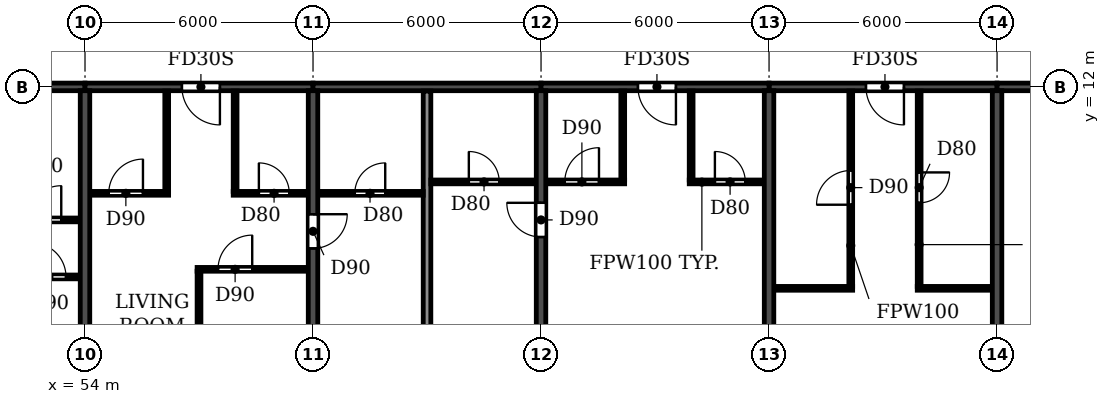
"""IFC4 building model, lengths in metres.
Left out: names, types, materials, properties, quantities, classifications, styles, units other than length and angle.
Written with IfcOpenShell. Run it as: python <this file> out.ifc"""

import sys

from ifc_helpers import new_model, si_unit, direction, frame, frame_2d, origin, place, context, subcontext, project, spatial, rectangle, extrude, element, fill, save


model = new_model("IFC4")
c1 = context("Model", 3, precision=1e-05, world=origin(), true_north=direction((0.0, 1.0)))
c2 = subcontext(c1, "Body", "Model", "MODEL_VIEW")
j1 = project(units=[si_unit("LENGTHUNIT", "METRE"), si_unit("PLANEANGLEUNIT", "RADIAN")], contexts=[c1])
p1 = place(None, origin())
s1 = spatial("IfcSite", under=j1, at=p1, CompositionType="ELEMENT")
p2 = place(p1, origin())
s2 = spatial("IfcBuilding", under=s1, at=p2, CompositionType="ELEMENT")
p3 = place(p2, frame((0.0, 0.0, 201.6)))
s3 = spatial("IfcBuildingStorey", under=s2, at=p3, CompositionType="ELEMENT", Elevation=201.6)
p4 = place(p3, frame((54.0, 0.2, 0.0), z_axis=(0.0, 0.0, 1.0), x_axis=(0.0, 1.0, 0.0)))
e1 = element("IfcWall", 1, at=p4, inside=s3, PredefinedType="SHEAR", context=c2, shape_type="SweptSolid", body=[
    extrude(rectangle(XDim=11.7, YDim=0.25, at=frame_2d((5.85, 0.0))), origin(), (0.0, 0.0, 1.0), 3.08),
])
p5 = place(p3, frame((60.0, 0.2, 0.0), z_axis=(0.0, 0.0, 1.0), x_axis=(0.0, 1.0, 0.0)))
e2 = element("IfcWall", 2, at=p5, inside=s3, PredefinedType="SHEAR", context=c2, shape_type="SweptSolid", body=[
    extrude(rectangle(XDim=11.7, YDim=0.25, at=frame_2d((5.85, 0.0))), origin(), (0.0, 0.0, 1.0), 3.08),
])
p6 = place(p5, frame((7.55, 0.0, 0.0)))
e3 = element("IfcOpeningElement", 3, at=p6, cuts=e2, PredefinedType="OPENING", context=c2, shape_type="SweptSolid", body=[
    extrude(rectangle(XDim=0.9, YDim=2.1, at=frame_2d((0.45, 1.05))), frame((0.0, 0.135, 0.0), z_axis=(0.0, -1.0, 0.0), x_axis=(1.0, 0.0, 0.0)), (0.0, 0.0, 1.0), 0.27),
])
p7 = place(p3, frame((66.0, 0.2, 0.0), z_axis=(0.0, 0.0, 1.0), x_axis=(0.0, 1.0, 0.0)))
e4 = element("IfcWall", 4, at=p7, inside=s3, PredefinedType="SHEAR", context=c2, shape_type="SweptSolid", body=[
    extrude(rectangle(XDim=11.7, YDim=0.25, at=frame_2d((5.85, 0.0))), origin(), (0.0, 0.0, 1.0), 3.08),
])
p8 = place(p7, frame((7.85, 0.0, 0.0)))
e5 = element("IfcOpeningElement", 5, at=p8, cuts=e4, PredefinedType="OPENING", context=c2, shape_type="SweptSolid", body=[
    extrude(rectangle(XDim=0.9, YDim=2.1, at=frame_2d((0.45, 1.05))), frame((0.0, 0.135, 0.0), z_axis=(0.0, -1.0, 0.0), x_axis=(1.0, 0.0, 0.0)), (0.0, 0.0, 1.0), 0.27),
])
for number, where, z_axis, x_axis in (
    (6, (72.0, 0.2, 0.0), (0.0, 0.0, 1.0), (0.0, 1.0, 0.0)),
    (7, (78.0, 0.2, 0.0), (0.0, 0.0, 1.0), (0.0, 1.0, 0.0)),
):
    element("IfcWall", number, at=place(p3, frame(where, z_axis=z_axis, x_axis=x_axis)), inside=s3, PredefinedType="SHEAR", context=c2, shape_type="SweptSolid", body=[
        extrude(rectangle(XDim=11.7, YDim=0.25, at=frame_2d((5.85, 0.0))), origin(), (0.0, 0.0, 1.0), 3.08),
    ])
p9 = place(p3, frame((48.0, 12.0, 0.0), z_axis=(0.0, 0.0, 1.0), x_axis=(1.0, 0.0, 0.0)))
e8 = element("IfcWall", 8, at=p9, inside=s3, PredefinedType="SHEAR", context=c2, shape_type="SweptSolid", body=[
    extrude(rectangle(XDim=6.0, YDim=0.2, at=frame_2d((3.0, 0.0))), origin(), (0.0, 0.0, 1.0), 2.48),
])
p10 = place(p9, frame((2.45, 0.0, 0.0)))
e9 = element("IfcOpeningElement", 9, at=p10, cuts=e8, PredefinedType="OPENING", context=c2, shape_type="SweptSolid", body=[
    extrude(rectangle(XDim=1.0, YDim=2.1, at=frame_2d((0.5, 1.05))), frame((0.0, 0.11, 0.0), z_axis=(0.0, -1.0, 0.0), x_axis=(1.0, 0.0, 0.0)), (0.0, 0.0, 1.0), 0.22),
])
p11 = place(p3, frame((54.0, 12.0, 0.0), z_axis=(0.0, 0.0, 1.0), x_axis=(1.0, 0.0, 0.0)))
e10 = element("IfcWall", 10, at=p11, inside=s3, PredefinedType="SHEAR", context=c2, shape_type="SweptSolid", body=[
    extrude(rectangle(XDim=6.0, YDim=0.2, at=frame_2d((3.0, 0.0))), origin(), (0.0, 0.0, 1.0), 2.48),
])
p12 = place(p11, frame((2.55, 0.0, 0.0)))
e11 = element("IfcOpeningElement", 11, at=p12, cuts=e10, PredefinedType="OPENING", context=c2, shape_type="SweptSolid", body=[
    extrude(rectangle(XDim=1.0, YDim=2.1, at=frame_2d((0.5, 1.05))), frame((0.0, 0.11, 0.0), z_axis=(0.0, -1.0, 0.0), x_axis=(1.0, 0.0, 0.0)), (0.0, 0.0, 1.0), 0.22),
])
p13 = place(p3, frame((60.0, 12.0, 0.0), z_axis=(0.0, 0.0, 1.0), x_axis=(1.0, 0.0, 0.0)))
e12 = element("IfcWall", 12, at=p13, inside=s3, PredefinedType="SHEAR", context=c2, shape_type="SweptSolid", body=[
    extrude(rectangle(XDim=6.0, YDim=0.2, at=frame_2d((3.0, 0.0))), origin(), (0.0, 0.0, 1.0), 2.48),
])
p14 = place(p3, frame((66.0, 12.0, 0.0), z_axis=(0.0, 0.0, 1.0), x_axis=(1.0, 0.0, 0.0)))
e13 = element("IfcWall", 13, at=p14, inside=s3, PredefinedType="SHEAR", context=c2, shape_type="SweptSolid", body=[
    extrude(rectangle(XDim=6.0, YDim=0.2, at=frame_2d((3.0, 0.0))), origin(), (0.0, 0.0, 1.0), 2.48),
])
p15 = place(p14, frame((2.55, 0.0, 0.0)))
e14 = element("IfcOpeningElement", 14, at=p15, cuts=e13, PredefinedType="OPENING", context=c2, shape_type="SweptSolid", body=[
    extrude(rectangle(XDim=1.0, YDim=2.1, at=frame_2d((0.5, 1.05))), frame((0.0, 0.11, 0.0), z_axis=(0.0, -1.0, 0.0), x_axis=(1.0, 0.0, 0.0)), (0.0, 0.0, 1.0), 0.22),
])
p16 = place(p3, frame((72.0, 12.0, 0.0), z_axis=(0.0, 0.0, 1.0), x_axis=(1.0, 0.0, 0.0)))
e15 = element("IfcWall", 15, at=p16, inside=s3, PredefinedType="SHEAR", context=c2, shape_type="SweptSolid", body=[
    extrude(rectangle(XDim=6.0, YDim=0.2, at=frame_2d((3.0, 0.0))), origin(), (0.0, 0.0, 1.0), 2.48),
])
p17 = place(p16, frame((2.55, 0.0, 0.0)))
e16 = element("IfcOpeningElement", 16, at=p17, cuts=e15, PredefinedType="OPENING", context=c2, shape_type="SweptSolid", body=[
    extrude(rectangle(XDim=1.0, YDim=2.1, at=frame_2d((0.5, 1.05))), frame((0.0, 0.11, 0.0), z_axis=(0.0, -1.0, 0.0), x_axis=(1.0, 0.0, 0.0)), (0.0, 0.0, 1.0), 0.22),
])
p18 = place(p3, frame((78.0, 12.0, 0.0), z_axis=(0.0, 0.0, 1.0), x_axis=(1.0, 0.0, 0.0)))
e17 = element("IfcWall", 17, at=p18, inside=s3, PredefinedType="SHEAR", context=c2, shape_type="SweptSolid", body=[
    extrude(rectangle(XDim=5.8, YDim=0.2, at=frame_2d((2.9, 0.0))), origin(), (0.0, 0.0, 1.0), 2.48),
])
p19 = place(p18, frame((2.5, 0.0, 0.0)))
e18 = element("IfcOpeningElement", 18, at=p19, cuts=e17, PredefinedType="OPENING", context=c2, shape_type="SweptSolid", body=[
    extrude(rectangle(XDim=1.0, YDim=2.1, at=frame_2d((0.5, 1.05))), frame((0.0, 0.11, 0.0), z_axis=(0.0, -1.0, 0.0), x_axis=(1.0, 0.0, 0.0)), (0.0, 0.0, 1.0), 0.22),
])
p20 = place(p3, frame((63.0, 0.06, 0.0), z_axis=(0.0, 0.0, 1.0), x_axis=(0.0, 1.0, 0.0)))
e19 = element("IfcWall", 19, at=p20, inside=s3, PredefinedType="PARTITIONING", context=c2, shape_type="SweptSolid", body=[
    extrude(rectangle(XDim=11.83, YDim=0.2, at=frame_2d((5.915, 0.0))), origin(), (0.0, 0.0, 1.0), 3.08),
])
p21 = place(p3, frame((72.135, 6.7, 0.0), z_axis=(0.0, 0.0, 1.0), x_axis=(1.0, 0.0, 0.0)))
e20 = element("IfcWall", 20, at=p21, inside=s3, PredefinedType="PARTITIONING", context=c2, shape_type="SweptSolid", body=[
    extrude(rectangle(XDim=2.065, YDim=0.1, at=frame_2d((1.032, 0.0))), origin(), (0.0, 0.0, 1.0), 3.08),
])
p22 = place(p3, frame((75.9, 6.7, 0.0), z_axis=(0.0, 0.0, 1.0), x_axis=(1.0, 0.0, 0.0)))
e21 = element("IfcWall", 21, at=p22, inside=s3, PredefinedType="PARTITIONING", context=c2, shape_type="SweptSolid", body=[
    extrude(rectangle(XDim=1.965, YDim=0.1, at=frame_2d((0.982, 0.0))), origin(), (0.0, 0.0, 1.0), 3.08),
])
p23 = place(p3, frame((50.95, 7.0, 0.0), z_axis=(0.0, 0.0, 1.0), x_axis=(1.0, 0.0, 0.0)))
e22 = element("IfcWall", 22, at=p23, inside=s3, PredefinedType="PARTITIONING", context=c2, shape_type="SweptSolid", body=[
    extrude(rectangle(XDim=2.915, YDim=0.1, at=frame_2d((1.458, 0.0))), origin(), (0.0, 0.0, 1.0), 3.08),
])
p24 = place(p23, frame((1.65, 0.0, 0.0)))
e23 = element("IfcOpeningElement", 23, at=p24, cuts=e22, PredefinedType="OPENING", context=c2, shape_type="SweptSolid", body=[
    extrude(rectangle(XDim=0.9, YDim=2.1, at=frame_2d((0.45, 1.05))), frame((0.0, 0.06, 0.0), z_axis=(0.0, -1.0, 0.0), x_axis=(1.0, 0.0, 0.0)), (0.0, 0.0, 1.0), 0.12),
])
p25 = place(p3, frame((56.95, 7.2, 0.0), z_axis=(0.0, 0.0, 1.0), x_axis=(1.0, 0.0, 0.0)))
e24 = element("IfcWall", 24, at=p25, inside=s3, PredefinedType="PARTITIONING", context=c2, shape_type="SweptSolid", body=[
    extrude(rectangle(XDim=2.915, YDim=0.1, at=frame_2d((1.458, 0.0))), origin(), (0.0, 0.0, 1.0), 3.08),
])
p26 = place(p25, frame((0.55, 0.0, 0.0)))
e25 = element("IfcOpeningElement", 25, at=p26, cuts=e24, PredefinedType="OPENING", context=c2, shape_type="SweptSolid", body=[
    extrude(rectangle(XDim=0.9, YDim=2.1, at=frame_2d((0.45, 1.05))), frame((0.0, 0.06, 0.0), z_axis=(0.0, -1.0, 0.0), x_axis=(1.0, 0.0, 0.0)), (0.0, 0.0, 1.0), 0.12),
])
p27 = place(p3, frame((51.8, 8.5, 0.0), z_axis=(0.0, 0.0, 1.0), x_axis=(1.0, 0.0, 0.0)))
e26 = element("IfcWall", 26, at=p27, inside=s3, PredefinedType="PARTITIONING", context=c2, shape_type="SweptSolid", body=[
    extrude(rectangle(XDim=2.065, YDim=0.1, at=frame_2d((1.032, 0.0))), origin(), (0.0, 0.0, 1.0), 3.08),
])
p28 = place(p27, frame((0.675, 0.0, 0.0)))
e27 = element("IfcOpeningElement", 27, at=p28, cuts=e26, PredefinedType="OPENING", context=c2, shape_type="SweptSolid", body=[
    extrude(rectangle(XDim=0.9, YDim=2.1, at=frame_2d((0.45, 1.05))), frame((0.0, 0.06, 0.0), z_axis=(0.0, -1.0, 0.0), x_axis=(1.0, 0.0, 0.0)), (0.0, 0.0, 1.0), 0.12),
])
p29 = place(p3, frame((54.135, 9.2, 0.0), z_axis=(0.0, 0.0, 1.0), x_axis=(1.0, 0.0, 0.0)))
e28 = element("IfcWall", 28, at=p29, inside=s3, PredefinedType="PARTITIONING", context=c2, shape_type="SweptSolid", body=[
    extrude(rectangle(XDim=2.065, YDim=0.1, at=frame_2d((1.032, 0.0))), origin(), (0.0, 0.0, 1.0), 3.08),
])
p30 = place(p29, frame((0.49, 0.0, 0.0)))
e29 = element("IfcOpeningElement", 29, at=p30, cuts=e28, PredefinedType="OPENING", context=c2, shape_type="SweptSolid", body=[
    extrude(rectangle(XDim=0.9, YDim=2.1, at=frame_2d((0.45, 1.05))), frame((0.0, 0.06, 0.0), z_axis=(0.0, -1.0, 0.0), x_axis=(1.0, 0.0, 0.0)), (0.0, 0.0, 1.0), 0.12),
])
p31 = place(p3, frame((57.9, 9.2, 0.0), z_axis=(0.0, 0.0, 1.0), x_axis=(1.0, 0.0, 0.0)))
e30 = element("IfcWall", 30, at=p31, inside=s3, PredefinedType="PARTITIONING", context=c2, shape_type="SweptSolid", body=[
    extrude(rectangle(XDim=1.965, YDim=0.1, at=frame_2d((0.982, 0.0))), origin(), (0.0, 0.0, 1.0), 3.08),
])
p32 = place(p31, frame((0.675, 0.0, 0.0)))
e31 = element("IfcOpeningElement", 31, at=p32, cuts=e30, PredefinedType="OPENING", context=c2, shape_type="SweptSolid", body=[
    extrude(rectangle(XDim=0.8, YDim=2.1, at=frame_2d((0.4, 1.05))), frame((0.0, 0.06, 0.0), z_axis=(0.0, -1.0, 0.0), x_axis=(1.0, 0.0, 0.0)), (0.0, 0.0, 1.0), 0.12),
])
p33 = place(p3, frame((60.135, 9.2, 0.0), z_axis=(0.0, 0.0, 1.0), x_axis=(1.0, 0.0, 0.0)))
e32 = element("IfcWall", 32, at=p33, inside=s3, PredefinedType="PARTITIONING", context=c2, shape_type="SweptSolid", body=[
    extrude(rectangle(XDim=2.765, YDim=0.1, at=frame_2d((1.382, 0.0))), origin(), (0.0, 0.0, 1.0), 3.08),
])
p34 = place(p33, frame((0.965, 0.0, 0.0)))
e33 = element("IfcOpeningElement", 33, at=p34, cuts=e32, PredefinedType="OPENING", context=c2, shape_type="SweptSolid", body=[
    extrude(rectangle(XDim=0.8, YDim=2.1, at=frame_2d((0.4, 1.05))), frame((0.0, 0.06, 0.0), z_axis=(0.0, -1.0, 0.0), x_axis=(1.0, 0.0, 0.0)), (0.0, 0.0, 1.0), 0.12),
])
p35 = place(p3, frame((63.1, 9.5, 0.0), z_axis=(0.0, 0.0, 1.0), x_axis=(1.0, 0.0, 0.0)))
e34 = element("IfcWall", 34, at=p35, inside=s3, PredefinedType="PARTITIONING", context=c2, shape_type="SweptSolid", body=[
    extrude(rectangle(XDim=2.765, YDim=0.1, at=frame_2d((1.382, 0.0))), origin(), (0.0, 0.0, 1.0), 3.08),
])
p36 = place(p35, frame((1.0, 0.0, 0.0)))
e35 = element("IfcOpeningElement", 35, at=p36, cuts=e34, PredefinedType="OPENING", context=c2, shape_type="SweptSolid", body=[
    extrude(rectangle(XDim=0.8, YDim=2.1, at=frame_2d((0.4, 1.05))), frame((0.0, 0.06, 0.0), z_axis=(0.0, -1.0, 0.0), x_axis=(1.0, 0.0, 0.0)), (0.0, 0.0, 1.0), 0.12),
])
p37 = place(p3, frame((66.135, 9.5, 0.0), z_axis=(0.0, 0.0, 1.0), x_axis=(1.0, 0.0, 0.0)))
e36 = element("IfcWall", 36, at=p37, inside=s3, PredefinedType="PARTITIONING", context=c2, shape_type="SweptSolid", body=[
    extrude(rectangle(XDim=2.065, YDim=0.1, at=frame_2d((1.032, 0.0))), origin(), (0.0, 0.0, 1.0), 3.08),
])
p38 = place(p37, frame((0.49, 0.0, 0.0)))
e37 = element("IfcOpeningElement", 37, at=p38, cuts=e36, PredefinedType="OPENING", context=c2, shape_type="SweptSolid", body=[
    extrude(rectangle(XDim=0.9, YDim=2.1, at=frame_2d((0.45, 1.05))), frame((0.0, 0.06, 0.0), z_axis=(0.0, -1.0, 0.0), x_axis=(1.0, 0.0, 0.0)), (0.0, 0.0, 1.0), 0.12),
])
p39 = place(p3, frame((69.9, 9.5, 0.0), z_axis=(0.0, 0.0, 1.0), x_axis=(1.0, 0.0, 0.0)))
e38 = element("IfcWall", 38, at=p39, inside=s3, PredefinedType="PARTITIONING", context=c2, shape_type="SweptSolid", body=[
    extrude(rectangle(XDim=1.965, YDim=0.1, at=frame_2d((0.982, 0.0))), origin(), (0.0, 0.0, 1.0), 3.08),
])
p40 = place(p39, frame((0.675, 0.0, 0.0)))
e39 = element("IfcOpeningElement", 39, at=p40, cuts=e38, PredefinedType="OPENING", context=c2, shape_type="SweptSolid", body=[
    extrude(rectangle(XDim=0.8, YDim=2.1, at=frame_2d((0.4, 1.05))), frame((0.0, 0.06, 0.0), z_axis=(0.0, -1.0, 0.0), x_axis=(1.0, 0.0, 0.0)), (0.0, 0.0, 1.0), 0.12),
])
p41 = place(p3, frame((56.15, 9.25, 0.0), z_axis=(0.0, 0.0, 1.0), x_axis=(0.0, 1.0, 0.0)))
e40 = element("IfcWall", 40, at=p41, inside=s3, PredefinedType="PARTITIONING", context=c2, shape_type="SweptSolid", body=[
    extrude(rectangle(XDim=2.64, YDim=0.1, at=frame_2d((1.32, 0.0))), origin(), (0.0, 0.0, 1.0), 3.08),
])
p42 = place(p3, frame((57.0, 0.06, 0.0), z_axis=(0.0, 0.0, 1.0), x_axis=(0.0, 1.0, 0.0)))
e41 = element("IfcWall", 41, at=p42, inside=s3, PredefinedType="PARTITIONING", context=c2, shape_type="SweptSolid", body=[
    extrude(rectangle(XDim=7.09, YDim=0.1, at=frame_2d((3.545, 0.0))), origin(), (0.0, 0.0, 1.0), 3.08),
])
p43 = place(p3, frame((57.95, 9.25, 0.0), z_axis=(0.0, 0.0, 1.0), x_axis=(0.0, 1.0, 0.0)))
e42 = element("IfcWall", 42, at=p43, inside=s3, PredefinedType="PARTITIONING", context=c2, shape_type="SweptSolid", body=[
    extrude(rectangle(XDim=2.64, YDim=0.1, at=frame_2d((1.32, 0.0))), origin(), (0.0, 0.0, 1.0), 3.08),
])
for number, where, z_axis, x_axis in (
    (43, (68.15, 9.55, 0.0), (0.0, 0.0, 1.0), (0.0, 1.0, 0.0)),
    (44, (69.95, 9.55, 0.0), (0.0, 0.0, 1.0), (0.0, 1.0, 0.0)),
):
    element("IfcWall", number, at=place(p3, frame(where, z_axis=z_axis, x_axis=x_axis)), inside=s3, PredefinedType="PARTITIONING", context=c2, shape_type="SweptSolid", body=[
        extrude(rectangle(XDim=2.34, YDim=0.1, at=frame_2d((1.17, 0.0))), origin(), (0.0, 0.0, 1.0), 3.08),
    ])
p44 = place(p3, frame((74.15, 6.75, 0.0), z_axis=(0.0, 0.0, 1.0), x_axis=(0.0, 1.0, 0.0)))
e45 = element("IfcWall", 45, at=p44, inside=s3, PredefinedType="PARTITIONING", context=c2, shape_type="SweptSolid", body=[
    extrude(rectangle(XDim=5.14, YDim=0.1, at=frame_2d((2.57, 0.0))), origin(), (0.0, 0.0, 1.0), 3.08),
])
p45 = place(p44, frame((2.15, 0.0, 0.0)))
e46 = element("IfcOpeningElement", 46, at=p45, cuts=e45, PredefinedType="OPENING", context=c2, shape_type="SweptSolid", body=[
    extrude(rectangle(XDim=0.9, YDim=2.1, at=frame_2d((0.45, 1.05))), frame((0.0, 0.06, 0.0), z_axis=(0.0, -1.0, 0.0), x_axis=(1.0, 0.0, 0.0)), (0.0, 0.0, 1.0), 0.12),
])
p46 = place(p3, frame((75.95, 6.75, 0.0), z_axis=(0.0, 0.0, 1.0), x_axis=(0.0, 1.0, 0.0)))
e47 = element("IfcWall", 47, at=p46, inside=s3, PredefinedType="PARTITIONING", context=c2, shape_type="SweptSolid", body=[
    extrude(rectangle(XDim=5.14, YDim=0.1, at=frame_2d((2.57, 0.0))), origin(), (0.0, 0.0, 1.0), 3.08),
])
p47 = place(p46, frame((2.2, 0.0, 0.0)))
e48 = element("IfcOpeningElement", 48, at=p47, cuts=e47, PredefinedType="OPENING", context=c2, shape_type="SweptSolid", body=[
    extrude(rectangle(XDim=0.8, YDim=2.1, at=frame_2d((0.4, 1.05))), frame((0.0, 0.06, 0.0), z_axis=(0.0, -1.0, 0.0), x_axis=(1.0, 0.0, 0.0)), (0.0, 0.0, 1.0), 0.12),
])
p48 = place(p28, origin())
e49 = element("IfcDoor", 49, at=p48, inside=s3, OperationType="SINGLE_SWING_RIGHT", PredefinedType="DOOR", context=c2, shape_type="SweptSolid", body=[
    extrude(rectangle(XDim=0.9, YDim=2.1, at=frame_2d((0.45, 1.05))), frame((0.0, 0.025, 0.0), z_axis=(0.0, -1.0, 0.0), x_axis=(1.0, 0.0, 0.0)), (0.0, 0.0, 1.0), 0.05),
])
fill(e27, e49)
p49 = place(p24, origin())
e50 = element("IfcDoor", 50, at=p49, inside=s3, OperationType="SINGLE_SWING_LEFT", PredefinedType="DOOR", context=c2, shape_type="SweptSolid", body=[
    extrude(rectangle(XDim=0.9, YDim=2.1, at=frame_2d((0.45, 1.05))), frame((0.0, 0.025, 0.0), z_axis=(0.0, -1.0, 0.0), x_axis=(1.0, 0.0, 0.0)), (0.0, 0.0, 1.0), 0.05),
])
fill(e23, e50)
p50 = place(p34, origin())
e51 = element("IfcDoor", 51, at=p50, inside=s3, OperationType="SINGLE_SWING_RIGHT", PredefinedType="DOOR", context=c2, shape_type="SweptSolid", body=[
    extrude(rectangle(XDim=0.8, YDim=2.1, at=frame_2d((0.4, 1.05))), frame((0.0, 0.025, 0.0), z_axis=(0.0, -1.0, 0.0), x_axis=(1.0, 0.0, 0.0)), (0.0, 0.0, 1.0), 0.05),
])
fill(e33, e51)
p51 = place(p30, origin())
e52 = element("IfcDoor", 52, at=p51, inside=s3, OperationType="SINGLE_SWING_RIGHT", PredefinedType="DOOR", context=c2, shape_type="SweptSolid", body=[
    extrude(rectangle(XDim=0.9, YDim=2.1, at=frame_2d((0.45, 1.05))), frame((0.0, 0.025, 0.0), z_axis=(0.0, -1.0, 0.0), x_axis=(1.0, 0.0, 0.0)), (0.0, 0.0, 1.0), 0.05),
])
fill(e29, e52)
p52 = place(p12, frame((1.0, 0.0, 0.0), z_axis=(0.0, 0.0, 1.0), x_axis=(-1.0, 0.0, 0.0)))
e53 = element("IfcDoor", 53, at=p52, inside=s3, OperationType="SINGLE_SWING_LEFT", PredefinedType="DOOR", context=c2, shape_type="SweptSolid", body=[
    extrude(rectangle(XDim=1.0, YDim=2.1, at=frame_2d((0.5, 1.05))), frame((0.0, 0.025, 0.0), z_axis=(0.0, -1.0, 0.0), x_axis=(1.0, 0.0, 0.0)), (0.0, 0.0, 1.0), 0.05),
])
fill(e11, e53)
p53 = place(p26, origin())
e54 = element("IfcDoor", 54, at=p53, inside=s3, OperationType="SINGLE_SWING_RIGHT", PredefinedType="DOOR", context=c2, shape_type="SweptSolid", body=[
    extrude(rectangle(XDim=0.9, YDim=2.1, at=frame_2d((0.45, 1.05))), frame((0.0, 0.025, 0.0), z_axis=(0.0, -1.0, 0.0), x_axis=(1.0, 0.0, 0.0)), (0.0, 0.0, 1.0), 0.05),
])
fill(e25, e54)
p54 = place(p32, origin())
e55 = element("IfcDoor", 55, at=p54, inside=s3, OperationType="SINGLE_SWING_LEFT", PredefinedType="DOOR", context=c2, shape_type="SweptSolid", body=[
    extrude(rectangle(XDim=0.8, YDim=2.1, at=frame_2d((0.4, 1.05))), frame((0.0, 0.025, 0.0), z_axis=(0.0, -1.0, 0.0), x_axis=(1.0, 0.0, 0.0)), (0.0, 0.0, 1.0), 0.05),
])
fill(e31, e55)
p55 = place(p6, frame((0.9, 0.0, 0.0), z_axis=(0.0, 0.0, 1.0), x_axis=(-1.0, 0.0, 0.0)))
e56 = element("IfcDoor", 56, at=p55, inside=s3, OperationType="SINGLE_SWING_LEFT", PredefinedType="DOOR", context=c2, shape_type="SweptSolid", body=[
    extrude(rectangle(XDim=0.9, YDim=2.1, at=frame_2d((0.45, 1.05))), frame((0.0, 0.025, 0.0), z_axis=(0.0, -1.0, 0.0), x_axis=(1.0, 0.0, 0.0)), (0.0, 0.0, 1.0), 0.05),
])
fill(e3, e56)
p56 = place(p36, origin())
e57 = element("IfcDoor", 57, at=p56, inside=s3, OperationType="SINGLE_SWING_LEFT", PredefinedType="DOOR", context=c2, shape_type="SweptSolid", body=[
    extrude(rectangle(XDim=0.8, YDim=2.1, at=frame_2d((0.4, 1.05))), frame((0.0, 0.025, 0.0), z_axis=(0.0, -1.0, 0.0), x_axis=(1.0, 0.0, 0.0)), (0.0, 0.0, 1.0), 0.05),
])
fill(e35, e57)
p57 = place(p8, origin())
e58 = element("IfcDoor", 58, at=p57, inside=s3, OperationType="SINGLE_SWING_RIGHT", PredefinedType="DOOR", context=c2, shape_type="SweptSolid", body=[
    extrude(rectangle(XDim=0.9, YDim=2.1, at=frame_2d((0.45, 1.05))), frame((0.0, 0.025, 0.0), z_axis=(0.0, -1.0, 0.0), x_axis=(1.0, 0.0, 0.0)), (0.0, 0.0, 1.0), 0.05),
])
fill(e5, e58)
p58 = place(p38, origin())
e59 = element("IfcDoor", 59, at=p58, inside=s3, OperationType="SINGLE_SWING_RIGHT", PredefinedType="DOOR", context=c2, shape_type="SweptSolid", body=[
    extrude(rectangle(XDim=0.9, YDim=2.1, at=frame_2d((0.45, 1.05))), frame((0.0, 0.025, 0.0), z_axis=(0.0, -1.0, 0.0), x_axis=(1.0, 0.0, 0.0)), (0.0, 0.0, 1.0), 0.05),
])
fill(e37, e59)
p59 = place(p15, frame((1.0, 0.0, 0.0), z_axis=(0.0, 0.0, 1.0), x_axis=(-1.0, 0.0, 0.0)))
e60 = element("IfcDoor", 60, at=p59, inside=s3, OperationType="SINGLE_SWING_LEFT", PredefinedType="DOOR", context=c2, shape_type="SweptSolid", body=[
    extrude(rectangle(XDim=1.0, YDim=2.1, at=frame_2d((0.5, 1.05))), frame((0.0, 0.025, 0.0), z_axis=(0.0, -1.0, 0.0), x_axis=(1.0, 0.0, 0.0)), (0.0, 0.0, 1.0), 0.05),
])
fill(e14, e60)
p60 = place(p40, origin())
e61 = element("IfcDoor", 61, at=p60, inside=s3, OperationType="SINGLE_SWING_LEFT", PredefinedType="DOOR", context=c2, shape_type="SweptSolid", body=[
    extrude(rectangle(XDim=0.8, YDim=2.1, at=frame_2d((0.4, 1.05))), frame((0.0, 0.025, 0.0), z_axis=(0.0, -1.0, 0.0), x_axis=(1.0, 0.0, 0.0)), (0.0, 0.0, 1.0), 0.05),
])
fill(e39, e61)
p61 = place(p45, origin())
e62 = element("IfcDoor", 62, at=p61, inside=s3, OperationType="SINGLE_SWING_LEFT", PredefinedType="DOOR", context=c2, shape_type="SweptSolid", body=[
    extrude(rectangle(XDim=0.9, YDim=2.1, at=frame_2d((0.45, 1.05))), frame((0.0, 0.025, 0.0), z_axis=(0.0, -1.0, 0.0), x_axis=(1.0, 0.0, 0.0)), (0.0, 0.0, 1.0), 0.05),
])
fill(e46, e62)
p62 = place(p17, frame((1.0, 0.0, 0.0), z_axis=(0.0, 0.0, 1.0), x_axis=(-1.0, 0.0, 0.0)))
e63 = element("IfcDoor", 63, at=p62, inside=s3, OperationType="SINGLE_SWING_LEFT", PredefinedType="DOOR", context=c2, shape_type="SweptSolid", body=[
    extrude(rectangle(XDim=1.0, YDim=2.1, at=frame_2d((0.5, 1.05))), frame((0.0, 0.025, 0.0), z_axis=(0.0, -1.0, 0.0), x_axis=(1.0, 0.0, 0.0)), (0.0, 0.0, 1.0), 0.05),
])
fill(e16, e63)
p63 = place(p47, frame((0.8, 0.0, 0.0), z_axis=(0.0, 0.0, 1.0), x_axis=(-1.0, 0.0, 0.0)))
e64 = element("IfcDoor", 64, at=p63, inside=s3, OperationType="SINGLE_SWING_LEFT", PredefinedType="DOOR", context=c2, shape_type="SweptSolid", body=[
    extrude(rectangle(XDim=0.8, YDim=2.1, at=frame_2d((0.4, 1.05))), frame((0.0, 0.025, 0.0), z_axis=(0.0, -1.0, 0.0), x_axis=(1.0, 0.0, 0.0)), (0.0, 0.0, 1.0), 0.05),
])
fill(e48, e64)
save(model, sys.argv[1])
